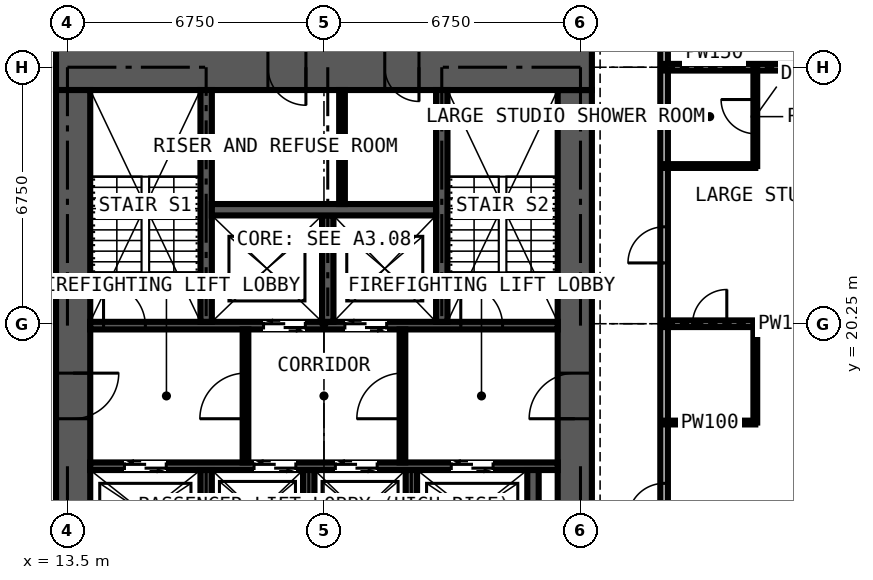
"""IFC4 building model, lengths in metres.
Left out: names, types, materials, properties, quantities, classifications, styles, units other than length and angle.
Written with IfcOpenShell. Run it as: python <this file> out.ifc"""

import sys

from ifc_helpers import new_model, si_unit, direction, frame, frame_2d, origin, place, context, subcontext, project, spatial, rectangle, extrude, element, fill, save


model = new_model("IFC4")
c1 = context("Model", 3, precision=1e-05, world=origin(), true_north=direction((0.0, 1.0)))
c2 = subcontext(c1, "Body", "Model", "MODEL_VIEW")
j1 = project(units=[si_unit("LENGTHUNIT", "METRE"), si_unit("PLANEANGLEUNIT", "RADIAN")], contexts=[c1])
p1 = place(None, origin())
s1 = spatial("IfcSite", under=j1, at=p1, CompositionType="ELEMENT")
p2 = place(p1, origin())
s2 = spatial("IfcBuilding", under=s1, at=p2, CompositionType="ELEMENT")
p3 = place(p2, frame((0.0, 0.0, 215.1)))
s3 = spatial("IfcBuildingStorey", under=s2, at=p3, CompositionType="ELEMENT", Elevation=215.1)
p4 = place(p3, frame((26.85, 14.1, 0.0), z_axis=(0.0, 0.0, 1.0), x_axis=(0.0, 1.0, 0.0)))
e1 = element("IfcWall", 1, at=p4, inside=s3, PredefinedType="SHEAR", context=c2, shape_type="SweptSolid", body=[
    extrude(rectangle(XDim=12.3, YDim=0.9, at=frame_2d((6.15, 0.0))), origin(), (0.0, 0.0, 1.0), 3.6),
])
p5 = place(p4, frame((3.65, 0.0, 0.0)))
e2 = element("IfcOpeningElement", 2, at=p5, cuts=e1, PredefinedType="OPENING", context=c2, shape_type="SweptSolid", body=[
    extrude(rectangle(XDim=1.2, YDim=2.2, at=frame_2d((0.6, 1.1))), frame((0.0, 0.46, 0.0), z_axis=(0.0, -1.0, 0.0), x_axis=(1.0, 0.0, 0.0)), (0.0, 0.0, 1.0), 0.92),
])
p6 = place(p3, frame((27.3, 27.0, 0.0), z_axis=(0.0, 0.0, 1.0), x_axis=(-1.0, 0.0, 0.0)))
e3 = element("IfcWall", 3, at=p6, inside=s3, PredefinedType="SHEAR", context=c2, shape_type="SweptSolid", body=[
    extrude(rectangle(XDim=14.1, YDim=1.2, at=frame_2d((7.05, 0.0))), origin(), (0.0, 0.0, 1.0), 3.6),
])
p7 = place(p6, frame((4.55, 0.0, 0.0)))
e4 = element("IfcOpeningElement", 4, at=p7, cuts=e3, PredefinedType="OPENING", context=c2, shape_type="SweptSolid", body=[
    extrude(rectangle(XDim=0.9, YDim=2.2, at=frame_2d((0.45, 1.1))), frame((0.0, 0.61, 0.0), z_axis=(0.0, -1.0, 0.0), x_axis=(1.0, 0.0, 0.0)), (0.0, 0.0, 1.0), 1.22),
])
p8 = place(p6, frame((7.525, 0.0, 0.0)))
e5 = element("IfcOpeningElement", 5, at=p8, cuts=e3, PredefinedType="OPENING", context=c2, shape_type="SweptSolid", body=[
    extrude(rectangle(XDim=1.0, YDim=2.2, at=frame_2d((0.5, 1.1))), frame((0.0, 0.61, 0.0), z_axis=(0.0, -1.0, 0.0), x_axis=(1.0, 0.0, 0.0)), (0.0, 0.0, 1.0), 1.22),
])
p9 = place(p3, frame((13.65, 26.4, 0.0), z_axis=(0.0, 0.0, 1.0), x_axis=(0.0, -1.0, 0.0)))
e6 = element("IfcWall", 6, at=p9, inside=s3, PredefinedType="SHEAR", context=c2, shape_type="SweptSolid", body=[
    extrude(rectangle(XDim=12.3, YDim=0.9, at=frame_2d((6.15, 0.0))), origin(), (0.0, 0.0, 1.0), 3.6),
])
p10 = place(p9, frame((7.45, 0.0, 0.0)))
e7 = element("IfcOpeningElement", 7, at=p10, cuts=e6, PredefinedType="OPENING", context=c2, shape_type="SweptSolid", body=[
    extrude(rectangle(XDim=1.2, YDim=2.2, at=frame_2d((0.6, 1.1))), frame((0.0, 0.46, 0.0), z_axis=(0.0, -1.0, 0.0), x_axis=(1.0, 0.0, 0.0)), (0.0, 0.0, 1.0), 0.92),
])
p11 = place(p3, frame((14.1, 16.5, 0.0), z_axis=(0.0, 0.0, 1.0), x_axis=(1.0, 0.0, 0.0)))
e8 = element("IfcWall", 8, at=p11, inside=s3, PredefinedType="SHEAR", context=c2, shape_type="SweptSolid", body=[
    extrude(rectangle(XDim=12.3, YDim=0.2, at=frame_2d((6.15, 0.0))), origin(), (0.0, 0.0, 1.0), 3.6),
])
p12 = place(p11, frame((0.9, 0.0, 0.0)))
e9 = element("IfcOpeningElement", 9, at=p12, cuts=e8, PredefinedType="OPENING", context=c2, shape_type="SweptSolid", body=[
    extrude(rectangle(XDim=1.1, YDim=2.2, at=frame_2d((0.55, 1.1))), frame((0.0, 0.11, 0.0), z_axis=(0.0, -1.0, 0.0), x_axis=(1.0, 0.0, 0.0)), (0.0, 0.0, 1.0), 0.22),
])
p13 = place(p11, frame((4.31, 0.0, 0.0)))
e10 = element("IfcOpeningElement", 10, at=p13, cuts=e8, PredefinedType="OPENING", context=c2, shape_type="SweptSolid", body=[
    extrude(rectangle(XDim=1.1, YDim=2.2, at=frame_2d((0.55, 1.1))), frame((0.0, 0.11, 0.0), z_axis=(0.0, -1.0, 0.0), x_axis=(1.0, 0.0, 0.0)), (0.0, 0.0, 1.0), 0.22),
])
p14 = place(p11, frame((6.45, 0.0, 0.0)))
e11 = element("IfcOpeningElement", 11, at=p14, cuts=e8, PredefinedType="OPENING", context=c2, shape_type="SweptSolid", body=[
    extrude(rectangle(XDim=1.1, YDim=2.2, at=frame_2d((0.55, 1.1))), frame((0.0, 0.11, 0.0), z_axis=(0.0, -1.0, 0.0), x_axis=(1.0, 0.0, 0.0)), (0.0, 0.0, 1.0), 0.22),
])
p15 = place(p11, frame((9.5, 0.0, 0.0)))
e12 = element("IfcOpeningElement", 12, at=p15, cuts=e8, PredefinedType="OPENING", context=c2, shape_type="SweptSolid", body=[
    extrude(rectangle(XDim=1.1, YDim=2.2, at=frame_2d((0.55, 1.1))), frame((0.0, 0.11, 0.0), z_axis=(0.0, -1.0, 0.0), x_axis=(1.0, 0.0, 0.0)), (0.0, 0.0, 1.0), 0.22),
])
p16 = place(p3, frame((14.1, 20.2, 0.0), z_axis=(0.0, 0.0, 1.0), x_axis=(1.0, 0.0, 0.0)))
e13 = element("IfcWall", 13, at=p16, inside=s3, PredefinedType="SHEAR", context=c2, shape_type="SweptSolid", body=[
    extrude(rectangle(XDim=12.3, YDim=0.2, at=frame_2d((6.15, 0.0))), origin(), (0.0, 0.0, 1.0), 3.6),
])
p17 = place(p16, frame((4.56, 0.0, 0.0)))
e14 = element("IfcOpeningElement", 14, at=p17, cuts=e13, PredefinedType="OPENING", context=c2, shape_type="SweptSolid", body=[
    extrude(rectangle(XDim=1.1, YDim=2.2, at=frame_2d((0.55, 1.1))), frame((0.0, 0.11, 0.0), z_axis=(0.0, -1.0, 0.0), x_axis=(1.0, 0.0, 0.0)), (0.0, 0.0, 1.0), 0.22),
])
p18 = place(p16, frame((6.7, 0.0, 0.0)))
e15 = element("IfcOpeningElement", 15, at=p18, cuts=e13, PredefinedType="OPENING", context=c2, shape_type="SweptSolid", body=[
    extrude(rectangle(XDim=1.1, YDim=2.2, at=frame_2d((0.55, 1.1))), frame((0.0, 0.11, 0.0), z_axis=(0.0, -1.0, 0.0), x_axis=(1.0, 0.0, 0.0)), (0.0, 0.0, 1.0), 0.22),
])
p19 = place(p16, frame((0.35, 0.0, 0.0)))
e16 = element("IfcOpeningElement", 16, at=p19, cuts=e13, PredefinedType="OPENING", context=c2, shape_type="SweptSolid", body=[
    extrude(rectangle(XDim=1.1, YDim=2.2, at=frame_2d((0.55, 1.1))), frame((0.0, 0.11, 0.0), z_axis=(0.0, -1.0, 0.0), x_axis=(1.0, 0.0, 0.0)), (0.0, 0.0, 1.0), 0.22),
])
p20 = place(p16, frame((9.75, 0.0, 0.0)))
e17 = element("IfcOpeningElement", 17, at=p20, cuts=e13, PredefinedType="OPENING", context=c2, shape_type="SweptSolid", body=[
    extrude(rectangle(XDim=1.1, YDim=2.2, at=frame_2d((0.55, 1.1))), frame((0.0, 0.11, 0.0), z_axis=(0.0, -1.0, 0.0), x_axis=(1.0, 0.0, 0.0)), (0.0, 0.0, 1.0), 0.22),
])
for number, where, z_axis, x_axis in (
    (18, (17.15, 20.3, 0.0), (0.0, 0.0, 1.0), (0.0, 1.0, 0.0)),
    (19, (23.35, 20.3, 0.0), (0.0, 0.0, 1.0), (0.0, 1.0, 0.0)),
):
    element("IfcWall", number, at=place(p3, frame(where, z_axis=z_axis, x_axis=x_axis)), inside=s3, PredefinedType="SHEAR", context=c2, shape_type="SweptSolid", body=[
        extrude(rectangle(XDim=6.1, YDim=0.3, at=frame_2d((3.05, 0.0))), origin(), (0.0, 0.0, 1.0), 3.6),
    ])
p21 = place(p3, frame((20.35, 20.3, 0.0), z_axis=(0.0, 0.0, 1.0), x_axis=(0.0, 1.0, 0.0)))
e20 = element("IfcWall", 20, at=p21, inside=s3, PredefinedType="SHEAR", context=c2, shape_type="SweptSolid", body=[
    extrude(rectangle(XDim=2.8, YDim=0.3, at=frame_2d((1.4, 0.0))), origin(), (0.0, 0.0, 1.0), 3.6),
])
p22 = place(p3, frame((17.3, 23.25, 0.0), z_axis=(0.0, 0.0, 1.0), x_axis=(1.0, 0.0, 0.0)))
e21 = element("IfcWall", 21, at=p22, inside=s3, PredefinedType="SHEAR", context=c2, shape_type="SweptSolid", body=[
    extrude(rectangle(XDim=5.9, YDim=0.3, at=frame_2d((2.95, 0.0))), origin(), (0.0, 0.0, 1.0), 3.6),
])
for number, where, z_axis, x_axis in (
    (22, (17.15, 14.1, 0.0), (0.0, 0.0, 1.0), (0.0, 1.0, 0.0)),
    (23, (19.85, 14.1, 0.0), (0.0, 0.0, 1.0), (0.0, 1.0, 0.0)),
    (24, (22.55, 14.1, 0.0), (0.0, 0.0, 1.0), (0.0, 1.0, 0.0)),
    (25, (25.75, 14.1, 0.0), (0.0, 0.0, 1.0), (0.0, 1.0, 0.0)),
):
    element("IfcWall", number, at=place(p3, frame(where, z_axis=z_axis, x_axis=x_axis)), inside=s3, PredefinedType="SHEAR", context=c2, shape_type="SweptSolid", body=[
        extrude(rectangle(XDim=2.3, YDim=0.3, at=frame_2d((1.15, 0.0))), origin(), (0.0, 0.0, 1.0), 3.6),
    ])
p23 = place(p3, frame((18.185, 16.6, 0.0), z_axis=(0.0, 0.0, 1.0), x_axis=(0.0, 1.0, 0.0)))
e26 = element("IfcWall", 26, at=p23, inside=s3, PredefinedType="PARTITIONING", context=c2, shape_type="SweptSolid", body=[
    extrude(rectangle(XDim=3.5, YDim=0.15, at=frame_2d((1.75, 0.0))), origin(), (0.0, 0.0, 1.0), 3.375),
])
p24 = place(p23, frame((1.15, 0.0, 0.0)))
e27 = element("IfcOpeningElement", 27, at=p24, cuts=e26, PredefinedType="OPENING", context=c2, shape_type="SweptSolid", body=[
    extrude(rectangle(XDim=1.2, YDim=2.2, at=frame_2d((0.6, 1.1))), frame((0.0, 0.085, 0.0), z_axis=(0.0, -1.0, 0.0), x_axis=(1.0, 0.0, 0.0)), (0.0, 0.0, 1.0), 0.17),
])
p25 = place(p3, frame((22.315, 16.6, 0.0), z_axis=(0.0, 0.0, 1.0), x_axis=(0.0, 1.0, 0.0)))
e28 = element("IfcWall", 28, at=p25, inside=s3, PredefinedType="PARTITIONING", context=c2, shape_type="SweptSolid", body=[
    extrude(rectangle(XDim=3.5, YDim=0.15, at=frame_2d((1.75, 0.0))), origin(), (0.0, 0.0, 1.0), 3.375),
])
p26 = place(p25, frame((1.15, 0.0, 0.0)))
e29 = element("IfcOpeningElement", 29, at=p26, cuts=e28, PredefinedType="OPENING", context=c2, shape_type="SweptSolid", body=[
    extrude(rectangle(XDim=1.2, YDim=2.2, at=frame_2d((0.6, 1.1))), frame((0.0, 0.085, 0.0), z_axis=(0.0, -1.0, 0.0), x_axis=(1.0, 0.0, 0.0)), (0.0, 0.0, 1.0), 0.17),
])
p27 = place(p3, frame((20.725, 23.4, 0.0), z_axis=(0.0, 0.0, 1.0), x_axis=(0.0, 1.0, 0.0)))
e30 = element("IfcWall", 30, at=p27, inside=s3, PredefinedType="PARTITIONING", context=c2, shape_type="SweptSolid", body=[
    extrude(rectangle(XDim=3.0, YDim=0.15, at=frame_2d((1.5, 0.0))), origin(), (0.0, 0.0, 1.0), 3.375),
])
p28 = place(p3, frame((29.2, 11.3, 0.0), z_axis=(0.0, 0.0, 1.0), x_axis=(0.0, 1.0, 0.0)))
e31 = element("IfcWall", 31, at=p28, inside=s3, PredefinedType="PARTITIONING", context=c2, shape_type="SweptSolid", body=[
    extrude(rectangle(XDim=17.9, YDim=0.2, at=frame_2d((8.95, 0.0))), origin(), (0.0, 0.0, 1.0), 3.375),
])
p29 = place(p28, frame((0.6, 0.0, 0.0)))
e32 = element("IfcOpeningElement", 32, at=p29, cuts=e31, PredefinedType="OPENING", context=c2, shape_type="SweptSolid", body=[
    extrude(rectangle(XDim=1.0, YDim=2.2, at=frame_2d((0.5, 1.1))), frame((0.0, 0.11, 0.0), z_axis=(0.0, -1.0, 0.0), x_axis=(1.0, 0.0, 0.0)), (0.0, 0.0, 1.0), 0.22),
])
p30 = place(p28, frame((10.55, 0.0, 0.0)))
e33 = element("IfcOpeningElement", 33, at=p30, cuts=e31, PredefinedType="OPENING", context=c2, shape_type="SweptSolid", body=[
    extrude(rectangle(XDim=0.95, YDim=2.2, at=frame_2d((0.475, 1.1))), frame((0.0, 0.11, 0.0), z_axis=(0.0, -1.0, 0.0), x_axis=(1.0, 0.0, 0.0)), (0.0, 0.0, 1.0), 0.22),
])
p31 = place(p28, frame((3.8, 0.0, 0.0)))
e34 = element("IfcOpeningElement", 34, at=p31, cuts=e31, PredefinedType="OPENING", context=c2, shape_type="SweptSolid", body=[
    extrude(rectangle(XDim=0.95, YDim=2.2, at=frame_2d((0.475, 1.1))), frame((0.0, 0.11, 0.0), z_axis=(0.0, -1.0, 0.0), x_axis=(1.0, 0.0, 0.0)), (0.0, 0.0, 1.0), 0.22),
])
p32 = place(p28, frame((16.3, 0.0, 0.0)))
e35 = element("IfcOpeningElement", 35, at=p32, cuts=e31, PredefinedType="OPENING", context=c2, shape_type="SweptSolid", body=[
    extrude(rectangle(XDim=1.0, YDim=2.2, at=frame_2d((0.5, 1.1))), frame((0.0, 0.11, 0.0), z_axis=(0.0, -1.0, 0.0), x_axis=(1.0, 0.0, 0.0)), (0.0, 0.0, 1.0), 0.22),
])
p33 = place(p3, frame((29.2, 17.65, 0.0), z_axis=(0.0, 0.0, 1.0), x_axis=(1.0, 0.0, 0.0)))
e36 = element("IfcWall", 36, at=p33, inside=s3, PredefinedType="PARTITIONING", context=c2, shape_type="SweptSolid", body=[
    extrude(rectangle(XDim=2.4, YDim=0.1, at=frame_2d((1.2, 0.0))), origin(), (0.0, 0.0, 1.0), 3.375),
])
p34 = place(p3, frame((29.2, 20.25, 0.0), z_axis=(0.0, 0.0, 1.0), x_axis=(1.0, 0.0, 0.0)))
e37 = element("IfcWall", 37, at=p34, inside=s3, PredefinedType="PARTITIONING", context=c2, shape_type="SweptSolid", body=[
    extrude(rectangle(XDim=5.284, YDim=0.175, at=frame_2d((2.642, 0.0))), origin(), (0.0, 0.0, 1.0), 2.877),
])
p35 = place(p34, frame((0.75, 0.0, 0.0)))
e38 = element("IfcOpeningElement", 38, at=p35, cuts=e37, PredefinedType="OPENING", context=c2, shape_type="SweptSolid", body=[
    extrude(rectangle(XDim=0.9, YDim=2.2, at=frame_2d((0.45, 1.1))), frame((0.0, 0.097, 0.0), z_axis=(0.0, -1.0, 0.0), x_axis=(1.0, 0.0, 0.0)), (0.0, 0.0, 1.0), 0.195),
])
p36 = place(p3, frame((29.2, 24.4, 0.0), z_axis=(0.0, 0.0, 1.0), x_axis=(1.0, 0.0, 0.0)))
e39 = element("IfcWall", 39, at=p36, inside=s3, PredefinedType="PARTITIONING", context=c2, shape_type="SweptSolid", body=[
    extrude(rectangle(XDim=2.4, YDim=0.1, at=frame_2d((1.2, 0.0))), origin(), (0.0, 0.0, 1.0), 3.375),
])
p37 = place(p3, frame((29.2, 27.0, 0.0), z_axis=(0.0, 0.0, 1.0), x_axis=(1.0, 0.0, 0.0)))
e40 = element("IfcWall", 40, at=p37, inside=s3, PredefinedType="PARTITIONING", context=c2, shape_type="SweptSolid", body=[
    extrude(rectangle(XDim=5.284, YDim=0.175, at=frame_2d((2.642, 0.0))), origin(), (0.0, 0.0, 1.0), 2.877),
])
p38 = place(p3, frame((31.125, 27.0, 0.0), z_axis=(0.0, 0.0, 1.0), x_axis=(0.0, 1.0, 0.0)))
e41 = element("IfcWall", 41, at=p38, inside=s3, PredefinedType="PARTITIONING", context=c2, shape_type="SweptSolid", body=[
    extrude(rectangle(XDim=0.734, YDim=0.15, at=frame_2d((0.367, 0.0))), origin(), (0.0, 0.0, 1.0), 3.375),
])
p39 = place(p3, frame((31.6, 17.65, 0.0), z_axis=(0.0, 0.0, 1.0), x_axis=(0.0, 1.0, 0.0)))
e42 = element("IfcWall", 42, at=p39, inside=s3, PredefinedType="PARTITIONING", context=c2, shape_type="SweptSolid", body=[
    extrude(rectangle(XDim=2.6, YDim=0.1, at=frame_2d((1.3, 0.0))), origin(), (0.0, 0.0, 1.0), 3.375),
])
p40 = place(p3, frame((31.6, 24.4, 0.0), z_axis=(0.0, 0.0, 1.0), x_axis=(0.0, 1.0, 0.0)))
e43 = element("IfcWall", 43, at=p40, inside=s3, PredefinedType="PARTITIONING", context=c2, shape_type="SweptSolid", body=[
    extrude(rectangle(XDim=2.6, YDim=0.1, at=frame_2d((1.3, 0.0))), origin(), (0.0, 0.0, 1.0), 3.375),
])
p41 = place(p40, frame((0.85, 0.0, 0.0)))
e44 = element("IfcOpeningElement", 44, at=p41, cuts=e43, PredefinedType="OPENING", context=c2, shape_type="SweptSolid", body=[
    extrude(rectangle(XDim=0.9, YDim=2.2, at=frame_2d((0.45, 1.1))), frame((0.0, 0.06, 0.0), z_axis=(0.0, -1.0, 0.0), x_axis=(1.0, 0.0, 0.0)), (0.0, 0.0, 1.0), 0.12),
])
p42 = place(p12, origin())
e45 = element("IfcDoor", 45, at=p42, inside=s3, OperationType="DOUBLE_DOOR_SLIDING", PredefinedType="DOOR", context=c2, shape_type="SweptSolid", body=[
    extrude(rectangle(XDim=1.1, YDim=2.2, at=frame_2d((0.55, 1.1))), frame((0.0, 0.025, 0.0), z_axis=(0.0, -1.0, 0.0), x_axis=(1.0, 0.0, 0.0)), (0.0, 0.0, 1.0), 0.05),
])
fill(e9, e45)
p43 = place(p13, origin())
e46 = element("IfcDoor", 46, at=p43, inside=s3, OperationType="DOUBLE_DOOR_SLIDING", PredefinedType="DOOR", context=c2, shape_type="SweptSolid", body=[
    extrude(rectangle(XDim=1.1, YDim=2.2, at=frame_2d((0.55, 1.1))), frame((0.0, 0.025, 0.0), z_axis=(0.0, -1.0, 0.0), x_axis=(1.0, 0.0, 0.0)), (0.0, 0.0, 1.0), 0.05),
])
fill(e10, e46)
p44 = place(p14, origin())
e47 = element("IfcDoor", 47, at=p44, inside=s3, OperationType="DOUBLE_DOOR_SLIDING", PredefinedType="DOOR", context=c2, shape_type="SweptSolid", body=[
    extrude(rectangle(XDim=1.1, YDim=2.2, at=frame_2d((0.55, 1.1))), frame((0.0, 0.025, 0.0), z_axis=(0.0, -1.0, 0.0), x_axis=(1.0, 0.0, 0.0)), (0.0, 0.0, 1.0), 0.05),
])
fill(e11, e47)
p45 = place(p15, origin())
e48 = element("IfcDoor", 48, at=p45, inside=s3, OperationType="DOUBLE_DOOR_SLIDING", PredefinedType="DOOR", context=c2, shape_type="SweptSolid", body=[
    extrude(rectangle(XDim=1.1, YDim=2.2, at=frame_2d((0.55, 1.1))), frame((0.0, 0.025, 0.0), z_axis=(0.0, -1.0, 0.0), x_axis=(1.0, 0.0, 0.0)), (0.0, 0.0, 1.0), 0.05),
])
fill(e12, e48)
p46 = place(p17, origin())
e49 = element("IfcDoor", 49, at=p46, inside=s3, OperationType="DOUBLE_DOOR_SLIDING", PredefinedType="DOOR", context=c2, shape_type="SweptSolid", body=[
    extrude(rectangle(XDim=1.1, YDim=2.2, at=frame_2d((0.55, 1.1))), frame((0.0, 0.025, 0.0), z_axis=(0.0, -1.0, 0.0), x_axis=(1.0, 0.0, 0.0)), (0.0, 0.0, 1.0), 0.05),
])
fill(e14, e49)
p47 = place(p18, origin())
e50 = element("IfcDoor", 50, at=p47, inside=s3, OperationType="DOUBLE_DOOR_SLIDING", PredefinedType="DOOR", context=c2, shape_type="SweptSolid", body=[
    extrude(rectangle(XDim=1.1, YDim=2.2, at=frame_2d((0.55, 1.1))), frame((0.0, 0.025, 0.0), z_axis=(0.0, -1.0, 0.0), x_axis=(1.0, 0.0, 0.0)), (0.0, 0.0, 1.0), 0.05),
])
fill(e15, e50)
p48 = place(p10, origin())
e51 = element("IfcDoor", 51, at=p48, inside=s3, OperationType="DOUBLE_DOOR_SINGLE_SWING", PredefinedType="DOOR", context=c2, shape_type="SweptSolid", body=[
    extrude(rectangle(XDim=1.2, YDim=2.2, at=frame_2d((0.6, 1.1))), frame((0.0, 0.025, 0.0), z_axis=(0.0, -1.0, 0.0), x_axis=(1.0, 0.0, 0.0)), (0.0, 0.0, 1.0), 0.05),
])
fill(e7, e51)
p49 = place(p5, origin())
e52 = element("IfcDoor", 52, at=p49, inside=s3, OperationType="DOUBLE_DOOR_SINGLE_SWING", PredefinedType="DOOR", context=c2, shape_type="SweptSolid", body=[
    extrude(rectangle(XDim=1.2, YDim=2.2, at=frame_2d((0.6, 1.1))), frame((0.0, 0.025, 0.0), z_axis=(0.0, -1.0, 0.0), x_axis=(1.0, 0.0, 0.0)), (0.0, 0.0, 1.0), 0.05),
])
fill(e2, e52)
p50 = place(p24, origin())
e53 = element("IfcDoor", 53, at=p50, inside=s3, OperationType="DOUBLE_DOOR_SINGLE_SWING", PredefinedType="DOOR", context=c2, shape_type="SweptSolid", body=[
    extrude(rectangle(XDim=1.2, YDim=2.2, at=frame_2d((0.6, 1.1))), frame((0.0, 0.025, 0.0), z_axis=(0.0, -1.0, 0.0), x_axis=(1.0, 0.0, 0.0)), (0.0, 0.0, 1.0), 0.05),
])
fill(e27, e53)
p51 = place(p26, origin())
e54 = element("IfcDoor", 54, at=p51, inside=s3, OperationType="DOUBLE_DOOR_SINGLE_SWING", PredefinedType="DOOR", context=c2, shape_type="SweptSolid", body=[
    extrude(rectangle(XDim=1.2, YDim=2.2, at=frame_2d((0.6, 1.1))), frame((0.0, 0.025, 0.0), z_axis=(0.0, -1.0, 0.0), x_axis=(1.0, 0.0, 0.0)), (0.0, 0.0, 1.0), 0.05),
])
fill(e29, e54)
p52 = place(p7, origin())
e55 = element("IfcDoor", 55, at=p52, inside=s3, OperationType="SINGLE_SWING_LEFT", PredefinedType="DOOR", context=c2, shape_type="SweptSolid", body=[
    extrude(rectangle(XDim=0.9, YDim=2.2, at=frame_2d((0.45, 1.1))), frame((0.0, 0.4, 0.0), z_axis=(0.0, -1.0, 0.0), x_axis=(1.0, 0.0, 0.0)), (0.0, 0.0, 1.0), 0.8),
])
fill(e4, e55)
p53 = place(p8, origin())
e56 = element("IfcDoor", 56, at=p53, inside=s3, OperationType="SINGLE_SWING_LEFT", PredefinedType="DOOR", context=c2, shape_type="SweptSolid", body=[
    extrude(rectangle(XDim=1.0, YDim=2.2, at=frame_2d((0.5, 1.1))), frame((0.0, 0.025, 0.0), z_axis=(0.0, -1.0, 0.0), x_axis=(1.0, 0.0, 0.0)), (0.0, 0.0, 1.0), 0.05),
])
fill(e5, e56)
p54 = place(p19, origin())
e57 = element("IfcDoor", 57, at=p54, inside=s3, OperationType="SINGLE_SWING_LEFT", PredefinedType="DOOR", context=c2, shape_type="SweptSolid", body=[
    extrude(rectangle(XDim=1.1, YDim=2.2, at=frame_2d((0.55, 1.1))), frame((0.0, 0.025, 0.0), z_axis=(0.0, -1.0, 0.0), x_axis=(1.0, 0.0, 0.0)), (0.0, 0.0, 1.0), 0.05),
])
fill(e16, e57)
p55 = place(p20, origin())
e58 = element("IfcDoor", 58, at=p55, inside=s3, OperationType="SINGLE_SWING_LEFT", PredefinedType="DOOR", context=c2, shape_type="SweptSolid", body=[
    extrude(rectangle(XDim=1.1, YDim=2.2, at=frame_2d((0.55, 1.1))), frame((0.0, 0.025, 0.0), z_axis=(0.0, -1.0, 0.0), x_axis=(1.0, 0.0, 0.0)), (0.0, 0.0, 1.0), 0.05),
])
fill(e17, e58)
p56 = place(p30, origin())
e59 = element("IfcDoor", 59, at=p56, inside=s3, OperationType="SINGLE_SWING_LEFT", PredefinedType="DOOR", context=c2, shape_type="SweptSolid", body=[
    extrude(rectangle(XDim=0.95, YDim=2.2, at=frame_2d((0.475, 1.1))), frame((0.0, 0.025, 0.0), z_axis=(0.0, -1.0, 0.0), x_axis=(1.0, 0.0, 0.0)), (0.0, 0.0, 1.0), 0.05),
])
fill(e33, e59)
p57 = place(p41, origin())
e60 = element("IfcDoor", 60, at=p57, inside=s3, OperationType="SINGLE_SWING_RIGHT", PredefinedType="DOOR", context=c2, shape_type="SweptSolid", body=[
    extrude(rectangle(XDim=0.9, YDim=2.2, at=frame_2d((0.45, 1.1))), frame((0.0, 0.025, 0.0), z_axis=(0.0, -1.0, 0.0), x_axis=(1.0, 0.0, 0.0)), (0.0, 0.0, 1.0), 0.05),
])
fill(e44, e60)
p58 = place(p31, origin())
e61 = element("IfcDoor", 61, at=p58, inside=s3, OperationType="SINGLE_SWING_LEFT", PredefinedType="DOOR", context=c2, shape_type="SweptSolid", body=[
    extrude(rectangle(XDim=0.95, YDim=2.2, at=frame_2d((0.475, 1.1))), frame((0.0, 0.025, 0.0), z_axis=(0.0, -1.0, 0.0), x_axis=(1.0, 0.0, 0.0)), (0.0, 0.0, 1.0), 0.05),
])
fill(e34, e61)
p59 = place(p35, origin())
e62 = element("IfcDoor", 62, at=p59, inside=s3, OperationType="SINGLE_SWING_RIGHT", PredefinedType="DOOR", context=c2, shape_type="SweptSolid", body=[
    extrude(rectangle(XDim=0.9, YDim=2.2, at=frame_2d((0.45, 1.1))), frame((0.0, 0.025, 0.0), z_axis=(0.0, -1.0, 0.0), x_axis=(1.0, 0.0, 0.0)), (0.0, 0.0, 1.0), 0.05),
])
fill(e38, e62)
save(model, sys.argv[1])
